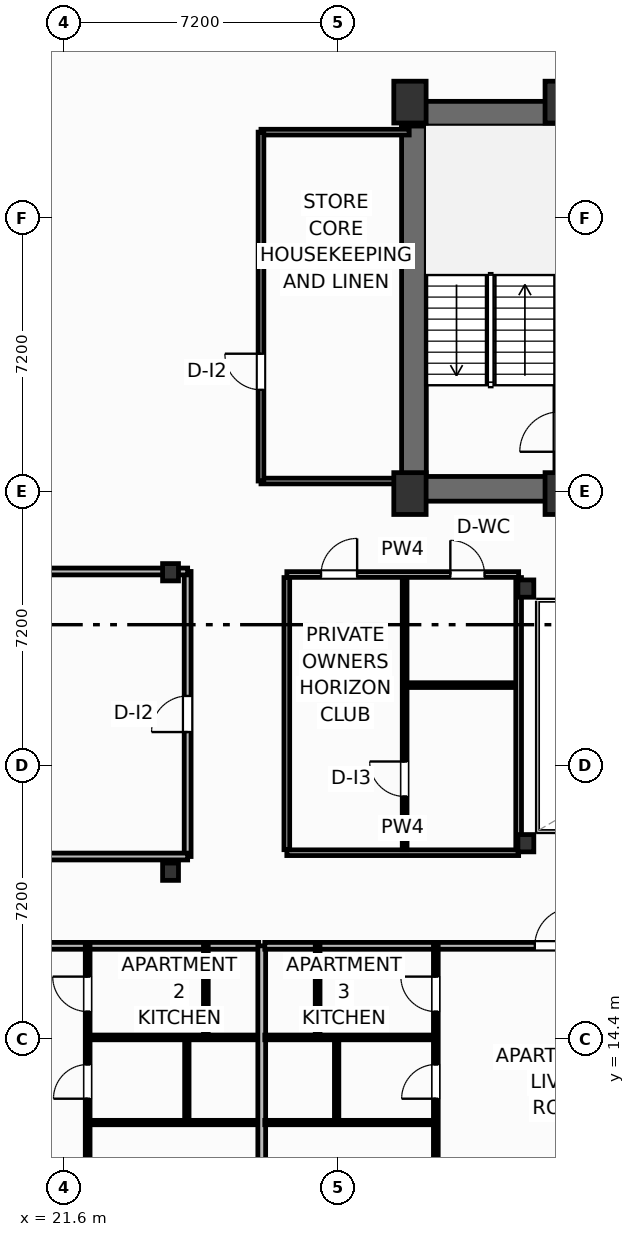
"""IFC4 building model, lengths in metres.
Left out: names, types, materials, properties, quantities, classifications, styles, units other than length and angle.
Written with IfcOpenShell. Run it as: python <this file> out.ifc"""

import sys

from ifc_helpers import new_model, si_unit, direction, frame, frame_2d, origin, origin_2d, place, context, subcontext, project, spatial, rectangle, i_section, extrude, element, fill, save


model = new_model("IFC4")
c1 = context("Model", 3, precision=1e-05, world=origin(), true_north=direction((0.0, 1.0)))
c2 = subcontext(c1, "Body", "Model", "MODEL_VIEW")
j1 = project(units=[si_unit("LENGTHUNIT", "METRE"), si_unit("PLANEANGLEUNIT", "RADIAN")], contexts=[c1])
p1 = place(None, origin())
s1 = spatial("IfcSite", under=j1, at=p1, CompositionType="ELEMENT")
p2 = place(p1, origin())
s2 = spatial("IfcBuilding", under=s1, at=p2, CompositionType="ELEMENT")
p3 = place(p2, frame((0.0, 0.0, 170.9)))
s3 = spatial("IfcBuildingStorey", under=s2, at=p3, CompositionType="ELEMENT", Elevation=170.9)
for number, where, z_axis, x_axis in (
    (1, (30.7, 28.75, 0.0), (0.0, 0.0, 1.0), (1.0, 0.0, 0.0)),
    (2, (34.68, 28.75, 0.0), (0.0, 0.0, 1.0), (1.0, 0.0, 0.0)),
    (3, (30.7, 39.05, 0.0), (0.0, 0.0, 1.0), (1.0, 0.0, 0.0)),
    (4, (34.68, 39.05, 0.0), (0.0, 0.0, 1.0), (1.0, 0.0, 0.0)),
):
    element("IfcColumn", number, at=place(p3, frame(where, z_axis=z_axis, x_axis=x_axis)), inside=s3, PredefinedType="COLUMN", context=c2, shape_type="SweptSolid", body=[
        extrude(rectangle(XDim=0.85, YDim=1.1, at=origin_2d()), origin(), (0.0, 0.0, 1.0), 3.7),
    ])
for number, where, z_axis, x_axis in (
    (5, (33.75, 19.55, 0.0), (0.0, 0.0, 1.0), (1.0, 0.0, 0.0)),
    (6, (33.75, 26.25, 0.0), (0.0, 0.0, 1.0), (1.0, 0.0, 0.0)),
    (7, (24.4, 18.8, 0.0), (0.0, 0.0, 1.0), (1.0, 0.0, 0.0)),
    (8, (24.4, 26.68, 0.0), (0.0, 0.0, 1.0), (1.0, 0.0, 0.0)),
):
    element("IfcColumn", number, at=place(p3, frame(where, z_axis=z_axis, x_axis=x_axis)), inside=s3, PredefinedType="COLUMN", context=c2, shape_type="SweptSolid", body=[
        extrude(i_section(OverallWidth=0.418, OverallDepth=0.455, WebThickness=0.042, FlangeThickness=0.068, FilletRadius=0.025, at=origin_2d()), origin(), (0.0, 0.0, 1.0), 3.7),
    ])
p4 = place(p3, frame((30.48, 38.745, 0.0), z_axis=(0.0, 0.0, 1.0), x_axis=(1.0, 0.0, 0.0)))
e9 = element("IfcWall", 9, at=p4, inside=s3, PredefinedType="SHEAR", context=c2, shape_type="SweptSolid", body=[
    extrude(rectangle(XDim=17.44, YDim=0.65, at=frame_2d((8.72, 0.0))), origin(), (0.0, 0.0, 1.0), 3.45),
])
p5 = place(p3, frame((30.805, 29.2, 0.0), z_axis=(0.0, 0.0, 1.0), x_axis=(0.0, 1.0, 0.0)))
e10 = element("IfcWall", 10, at=p5, inside=s3, PredefinedType="SHEAR", context=c2, shape_type="SweptSolid", body=[
    extrude(rectangle(XDim=9.22, YDim=0.65, at=frame_2d((4.61, 0.0))), origin(), (0.0, 0.0, 1.0), 3.45),
])
p6 = place(p3, frame((30.48, 28.875, 0.0), z_axis=(0.0, 0.0, 1.0), x_axis=(1.0, 0.0, 0.0)))
e11 = element("IfcWall", 11, at=p6, inside=s3, PredefinedType="SHEAR", context=c2, shape_type="SweptSolid", body=[
    extrude(rectangle(XDim=4.32, YDim=0.65, at=frame_2d((2.16, 0.0))), origin(), (0.0, 0.0, 1.0), 3.45),
])
p7 = place(p3, frame((34.64, 29.2, 0.0), z_axis=(0.0, 0.0, 1.0), x_axis=(0.0, 1.0, 0.0)))
e12 = element("IfcWall", 12, at=p7, inside=s3, PredefinedType="SHEAR", context=c2, shape_type="SweptSolid", body=[
    extrude(rectangle(XDim=9.22, YDim=0.25, at=frame_2d((4.61, 0.0))), origin(), (0.0, 0.0, 1.0), 3.45),
])
p8 = place(p7, frame((0.65, 0.0, 0.0)))
e13 = element("IfcOpeningElement", 13, at=p8, cuts=e12, PredefinedType="OPENING", context=c2, shape_type="SweptSolid", body=[
    extrude(rectangle(XDim=1.05, YDim=2.15, at=frame_2d((0.525, 1.075))), frame((0.0, 0.135, 0.0), z_axis=(0.0, -1.0, 0.0), x_axis=(1.0, 0.0, 0.0)), (0.0, 0.0, 1.0), 0.27),
])
p9 = place(p3, frame((16.08, 16.85, 0.0), z_axis=(0.0, 0.0, 1.0), x_axis=(1.0, 0.0, 0.0)))
e14 = element("IfcWall", 14, at=p9, inside=s3, PredefinedType="PARTITIONING", context=c2, shape_type="SweptSolid", body=[
    extrude(rectangle(XDim=10.64, YDim=0.18, at=frame_2d((5.32, 0.0))), origin(), (0.0, 0.0, 1.0), 3.45),
])
p10 = place(p9, frame((2.535, 0.0, 0.0)))
e15 = element("IfcOpeningElement", 15, at=p10, cuts=e14, PredefinedType="OPENING", context=c2, shape_type="SweptSolid", body=[
    extrude(rectangle(XDim=1.0, YDim=2.2, at=frame_2d((0.5, 1.1))), frame((0.0, 0.1, 0.0), z_axis=(0.0, -1.0, 0.0), x_axis=(1.0, 0.0, 0.0)), (0.0, 0.0, 1.0), 0.2),
])
p11 = place(p3, frame((22.219, 1.322, 0.0), z_axis=(0.0, 0.0, 1.0), x_axis=(0.0, 1.0, 0.0)))
e16 = element("IfcWall", 16, at=p11, inside=s3, PredefinedType="PARTITIONING", context=c2, shape_type="SweptSolid", body=[
    extrude(rectangle(XDim=15.528, YDim=0.125, at=frame_2d((7.764, 0.0))), origin(), (0.0, 0.0, 1.0), 3.45),
])
p12 = place(p11, frame((4.919, 0.0, 0.0)))
e17 = element("IfcOpeningElement", 17, at=p12, cuts=e16, PredefinedType="OPENING", context=c2, shape_type="SweptSolid", body=[
    extrude(rectangle(XDim=0.92, YDim=2.05, at=frame_2d((0.46, 1.025))), frame((0.0, 0.073, 0.0), z_axis=(0.0, -1.0, 0.0), x_axis=(1.0, 0.0, 0.0)), (0.0, 0.0, 1.0), 0.145),
])
p13 = place(p11, frame((11.505, 0.0, 0.0)))
e18 = element("IfcOpeningElement", 18, at=p13, cuts=e16, PredefinedType="OPENING", context=c2, shape_type="SweptSolid", body=[
    extrude(rectangle(XDim=0.9, YDim=2.05, at=frame_2d((0.45, 1.025))), frame((0.0, 0.073, 0.0), z_axis=(0.0, -1.0, 0.0), x_axis=(1.0, 0.0, 0.0)), (0.0, 0.0, 1.0), 0.145),
])
p14 = place(p11, frame((13.798, 0.0, 0.0)))
e19 = element("IfcOpeningElement", 19, at=p14, cuts=e16, PredefinedType="OPENING", context=c2, shape_type="SweptSolid", body=[
    extrude(rectangle(XDim=0.92, YDim=2.05, at=frame_2d((0.46, 1.025))), frame((0.0, 0.073, 0.0), z_axis=(0.0, -1.0, 0.0), x_axis=(1.0, 0.0, 0.0)), (0.0, 0.0, 1.0), 0.145),
])
p15 = place(p3, frame((22.289, 14.44, 0.0), z_axis=(0.0, 0.0, 1.0), x_axis=(1.0, 0.0, 0.0)))
e20 = element("IfcWall", 20, at=p15, inside=s3, PredefinedType="PARTITIONING", context=c2, shape_type="SweptSolid", body=[
    extrude(rectangle(XDim=4.431, YDim=0.125, at=frame_2d((2.215, 0.0))), origin(), (0.0, 0.0, 1.0), 3.45),
])
p16 = place(p3, frame((22.289, 12.2, 0.0), z_axis=(0.0, 0.0, 1.0), x_axis=(1.0, 0.0, 0.0)))
e21 = element("IfcWall", 21, at=p16, inside=s3, PredefinedType="PARTITIONING", context=c2, shape_type="SweptSolid", body=[
    extrude(rectangle(XDim=4.431, YDim=0.115, at=frame_2d((2.215, 0.0))), origin(), (0.0, 0.0, 1.0), 3.45),
])
p17 = place(p3, frame((25.329, 14.44, 0.0), z_axis=(0.0, 0.0, 1.0), x_axis=(0.0, 1.0, 0.0)))
e22 = element("IfcWall", 22, at=p17, inside=s3, PredefinedType="PARTITIONING", context=c2, shape_type="SweptSolid", body=[
    extrude(rectangle(XDim=2.41, YDim=0.125, at=frame_2d((1.205, 0.0))), origin(), (0.0, 0.0, 1.0), 3.45),
])
p18 = place(p3, frame((24.829, 12.2, 0.0), z_axis=(0.0, 0.0, 1.0), x_axis=(0.0, 1.0, 0.0)))
e23 = element("IfcWall", 23, at=p18, inside=s3, PredefinedType="PARTITIONING", context=c2, shape_type="SweptSolid", body=[
    extrude(rectangle(XDim=2.24, YDim=0.115, at=frame_2d((1.12, 0.0))), origin(), (0.0, 0.0, 1.0), 3.45),
])
p19 = place(p3, frame((26.8, 3.993, 0.0), z_axis=(0.0, 0.0, 1.0), x_axis=(0.0, 1.0, 0.0)))
e24 = element("IfcWall", 24, at=p19, inside=s3, PredefinedType="PARTITIONING", context=c2, shape_type="SweptSolid", body=[
    extrude(rectangle(XDim=12.857, YDim=0.205, at=frame_2d((6.429, 0.0))), origin(), (0.0, 0.0, 1.0), 3.45),
])
p20 = place(p3, frame((26.88, 16.85, 0.0), z_axis=(0.0, 0.0, 1.0), x_axis=(1.0, 0.0, 0.0)))
e25 = element("IfcWall", 25, at=p20, inside=s3, PredefinedType="PARTITIONING", context=c2, shape_type="SweptSolid", body=[
    extrude(rectangle(XDim=10.64, YDim=0.18, at=frame_2d((5.32, 0.0))), origin(), (0.0, 0.0, 1.0), 3.45),
])
p21 = place(p20, frame((7.105, 0.0, 0.0)))
e26 = element("IfcOpeningElement", 26, at=p21, cuts=e25, PredefinedType="OPENING", context=c2, shape_type="SweptSolid", body=[
    extrude(rectangle(XDim=1.0, YDim=2.2, at=frame_2d((0.5, 1.1))), frame((0.0, 0.1, 0.0), z_axis=(0.0, -1.0, 0.0), x_axis=(1.0, 0.0, 0.0)), (0.0, 0.0, 1.0), 0.2),
])
p22 = place(p3, frame((31.381, 2.433, 0.0), z_axis=(0.0, 0.0, 1.0), x_axis=(0.0, 1.0, 0.0)))
e27 = element("IfcWall", 27, at=p22, inside=s3, PredefinedType="PARTITIONING", context=c2, shape_type="SweptSolid", body=[
    extrude(rectangle(XDim=14.417, YDim=0.125, at=frame_2d((7.208, 0.0))), origin(), (0.0, 0.0, 1.0), 3.45),
])
p23 = place(p22, frame((4.364, 0.0, 0.0)))
e28 = element("IfcOpeningElement", 28, at=p23, cuts=e27, PredefinedType="OPENING", context=c2, shape_type="SweptSolid", body=[
    extrude(rectangle(XDim=0.92, YDim=2.05, at=frame_2d((0.46, 1.025))), frame((0.0, 0.073, 0.0), z_axis=(0.0, -1.0, 0.0), x_axis=(1.0, 0.0, 0.0)), (0.0, 0.0, 1.0), 0.145),
])
p24 = place(p22, frame((10.395, 0.0, 0.0)))
e29 = element("IfcOpeningElement", 29, at=p24, cuts=e27, PredefinedType="OPENING", context=c2, shape_type="SweptSolid", body=[
    extrude(rectangle(XDim=0.9, YDim=2.05, at=frame_2d((0.45, 1.025))), frame((0.0, 0.073, 0.0), z_axis=(0.0, -1.0, 0.0), x_axis=(1.0, 0.0, 0.0)), (0.0, 0.0, 1.0), 0.145),
])
p25 = place(p22, frame((12.687, 0.0, 0.0)))
e30 = element("IfcOpeningElement", 30, at=p25, cuts=e27, PredefinedType="OPENING", context=c2, shape_type="SweptSolid", body=[
    extrude(rectangle(XDim=0.92, YDim=2.05, at=frame_2d((0.46, 1.025))), frame((0.0, 0.073, 0.0), z_axis=(0.0, -1.0, 0.0), x_axis=(1.0, 0.0, 0.0)), (0.0, 0.0, 1.0), 0.145),
])
p26 = place(p3, frame((26.88, 14.44, 0.0), z_axis=(0.0, 0.0, 1.0), x_axis=(1.0, 0.0, 0.0)))
e31 = element("IfcWall", 31, at=p26, inside=s3, PredefinedType="PARTITIONING", context=c2, shape_type="SweptSolid", body=[
    extrude(rectangle(XDim=4.431, YDim=0.125, at=frame_2d((2.215, 0.0))), origin(), (0.0, 0.0, 1.0), 3.45),
])
p27 = place(p3, frame((26.88, 12.2, 0.0), z_axis=(0.0, 0.0, 1.0), x_axis=(1.0, 0.0, 0.0)))
e32 = element("IfcWall", 32, at=p27, inside=s3, PredefinedType="PARTITIONING", context=c2, shape_type="SweptSolid", body=[
    extrude(rectangle(XDim=4.431, YDim=0.115, at=frame_2d((2.215, 0.0))), origin(), (0.0, 0.0, 1.0), 3.45),
])
p28 = place(p3, frame((28.271, 14.44, 0.0), z_axis=(0.0, 0.0, 1.0), x_axis=(0.0, 1.0, 0.0)))
e33 = element("IfcWall", 33, at=p28, inside=s3, PredefinedType="PARTITIONING", context=c2, shape_type="SweptSolid", body=[
    extrude(rectangle(XDim=2.41, YDim=0.125, at=frame_2d((1.205, 0.0))), origin(), (0.0, 0.0, 1.0), 3.45),
])
p29 = place(p3, frame((28.771, 12.2, 0.0), z_axis=(0.0, 0.0, 1.0), x_axis=(0.0, 1.0, 0.0)))
e34 = element("IfcWall", 34, at=p29, inside=s3, PredefinedType="PARTITIONING", context=c2, shape_type="SweptSolid", body=[
    extrude(rectangle(XDim=2.24, YDim=0.115, at=frame_2d((1.12, 0.0))), origin(), (0.0, 0.0, 1.0), 3.45),
])
p30 = place(p3, frame((24.85, 19.2, 0.0), z_axis=(0.0, 0.0, 1.0), x_axis=(0.0, 1.0, 0.0)))
e35 = element("IfcWall", 35, at=p30, inside=s3, PredefinedType="PARTITIONING", context=c2, shape_type="SweptSolid", body=[
    extrude(rectangle(XDim=7.5, YDim=0.18, at=frame_2d((3.75, 0.0))), origin(), (0.0, 0.0, 1.0), 3.45),
])
p31 = place(p30, frame((3.275, 0.0, 0.0)))
e36 = element("IfcOpeningElement", 36, at=p31, cuts=e35, PredefinedType="OPENING", context=c2, shape_type="SweptSolid", body=[
    extrude(rectangle(XDim=0.95, YDim=2.05, at=frame_2d((0.475, 1.025))), frame((0.0, 0.1, 0.0), z_axis=(0.0, -1.0, 0.0), x_axis=(1.0, 0.0, 0.0)), (0.0, 0.0, 1.0), 0.2),
])
p32 = place(p3, frame((4.562, 19.2, 0.0), z_axis=(0.0, 0.0, 1.0), x_axis=(1.0, 0.0, 0.0)))
e37 = element("IfcWall", 37, at=p32, inside=s3, PredefinedType="PARTITIONING", context=c2, shape_type="SweptSolid", body=[
    extrude(rectangle(XDim=20.288, YDim=0.18, at=frame_2d((10.144, 0.0))), origin(), (0.0, 0.0, 1.0), 3.45),
])
p33 = place(p3, frame((3.653, 26.7, 0.0), z_axis=(0.0, 0.0, 1.0), x_axis=(1.0, 0.0, 0.0)))
e38 = element("IfcWall", 38, at=p33, inside=s3, PredefinedType="PARTITIONING", context=c2, shape_type="SweptSolid", body=[
    extrude(rectangle(XDim=21.197, YDim=0.18, at=frame_2d((10.599, 0.0))), origin(), (0.0, 0.0, 1.0), 2.662),
])
p34 = place(p3, frame((27.46, 26.62, 0.0), z_axis=(0.0, 0.0, 1.0), x_axis=(1.0, 0.0, 0.0)))
e39 = element("IfcWall", 39, at=p34, inside=s3, PredefinedType="PARTITIONING", context=c2, shape_type="SweptSolid", body=[
    extrude(rectangle(XDim=6.1, YDim=0.15, at=frame_2d((3.05, 0.0))), origin(), (0.0, 0.0, 1.0), 2.662),
])
p35 = place(p34, frame((0.9, 0.0, 0.0)))
e40 = element("IfcOpeningElement", 40, at=p35, cuts=e39, PredefinedType="OPENING", context=c2, shape_type="SweptSolid", body=[
    extrude(rectangle(XDim=0.95, YDim=2.05, at=frame_2d((0.475, 1.025))), frame((0.0, 0.085, 0.0), z_axis=(0.0, -1.0, 0.0), x_axis=(1.0, 0.0, 0.0)), (0.0, 0.0, 1.0), 0.17),
])
p36 = place(p34, frame((4.303, 0.0, 0.0)))
e41 = element("IfcOpeningElement", 41, at=p36, cuts=e39, PredefinedType="OPENING", context=c2, shape_type="SweptSolid", body=[
    extrude(rectangle(XDim=0.9, YDim=2.05, at=frame_2d((0.45, 1.025))), frame((0.0, 0.085, 0.0), z_axis=(0.0, -1.0, 0.0), x_axis=(1.0, 0.0, 0.0)), (0.0, 0.0, 1.0), 0.17),
])
p37 = place(p3, frame((27.46, 19.3, 0.0), z_axis=(0.0, 0.0, 1.0), x_axis=(1.0, 0.0, 0.0)))
e42 = element("IfcWall", 42, at=p37, inside=s3, PredefinedType="PARTITIONING", context=c2, shape_type="SweptSolid", body=[
    extrude(rectangle(XDim=6.1, YDim=0.15, at=frame_2d((3.05, 0.0))), origin(), (0.0, 0.0, 1.0), 2.662),
])
p38 = place(p3, frame((30.56, 19.38, 0.0), z_axis=(0.0, 0.0, 1.0), x_axis=(0.0, 1.0, 0.0)))
e43 = element("IfcWall", 43, at=p38, inside=s3, PredefinedType="PARTITIONING", context=c2, shape_type="SweptSolid", body=[
    extrude(rectangle(XDim=7.16, YDim=0.125, at=frame_2d((3.58, 0.0))), origin(), (0.0, 0.0, 1.0), 3.45),
])
p39 = place(p38, frame((1.4, 0.0, 0.0)))
e44 = element("IfcOpeningElement", 44, at=p39, cuts=e43, PredefinedType="OPENING", context=c2, shape_type="SweptSolid", body=[
    extrude(rectangle(XDim=0.92, YDim=2.05, at=frame_2d((0.46, 1.025))), frame((0.0, 0.073, 0.0), z_axis=(0.0, -1.0, 0.0), x_axis=(1.0, 0.0, 0.0)), (0.0, 0.0, 1.0), 0.145),
])
p40 = place(p3, frame((30.64, 23.71, 0.0), z_axis=(0.0, 0.0, 1.0), x_axis=(1.0, 0.0, 0.0)))
e45 = element("IfcWall", 45, at=p40, inside=s3, PredefinedType="PARTITIONING", context=c2, shape_type="SweptSolid", body=[
    extrude(rectangle(XDim=2.88, YDim=0.125, at=frame_2d((1.44, 0.0))), origin(), (0.0, 0.0, 1.0), 3.45),
])
p41 = place(p3, frame((27.46, 19.38, 0.0), z_axis=(0.0, 0.0, 1.0), x_axis=(0.0, 1.0, 0.0)))
e46 = element("IfcWall", 46, at=p41, inside=s3, PredefinedType="PARTITIONING", context=c2, shape_type="SweptSolid", body=[
    extrude(rectangle(XDim=7.16, YDim=0.15, at=frame_2d((3.58, 0.0))), origin(), (0.0, 0.0, 1.0), 3.45),
])
p42 = place(p3, frame((33.56, 19.38, 0.0), z_axis=(0.0, 0.0, 1.0), x_axis=(0.0, 1.0, 0.0)))
e47 = element("IfcWall", 47, at=p42, inside=s3, PredefinedType="PARTITIONING", context=c2, shape_type="SweptSolid", body=[
    extrude(rectangle(XDim=7.16, YDim=0.15, at=frame_2d((3.58, 0.0))), origin(), (0.0, 0.0, 1.0), 2.824),
])
p43 = place(p3, frame((26.78, 29.08, 0.0), z_axis=(0.0, 0.0, 1.0), x_axis=(1.0, 0.0, 0.0)))
e48 = element("IfcWall", 48, at=p43, inside=s3, PredefinedType="PARTITIONING", context=c2, shape_type="SweptSolid", body=[
    extrude(rectangle(XDim=3.7, YDim=0.15, at=frame_2d((1.85, 0.0))), origin(), (0.0, 0.0, 1.0), 3.45),
])
p44 = place(p3, frame((26.78, 38.26, 0.0), z_axis=(0.0, 0.0, 1.0), x_axis=(1.0, 0.0, 0.0)))
e49 = element("IfcWall", 49, at=p44, inside=s3, PredefinedType="PARTITIONING", context=c2, shape_type="SweptSolid", body=[
    extrude(rectangle(XDim=3.9, YDim=0.15, at=frame_2d((1.95, 0.0))), origin(), (0.0, 0.0, 1.0), 3.45),
])
p45 = place(p3, frame((26.78, 29.08, 0.0), z_axis=(0.0, 0.0, 1.0), x_axis=(0.0, 1.0, 0.0)))
e50 = element("IfcWall", 50, at=p45, inside=s3, PredefinedType="PARTITIONING", context=c2, shape_type="SweptSolid", body=[
    extrude(rectangle(XDim=9.18, YDim=0.15, at=frame_2d((4.59, 0.0))), origin(), (0.0, 0.0, 1.0), 3.45),
])
p46 = place(p45, frame((2.4, 0.0, 0.0)))
e51 = element("IfcOpeningElement", 51, at=p46, cuts=e50, PredefinedType="OPENING", context=c2, shape_type="SweptSolid", body=[
    extrude(rectangle(XDim=0.95, YDim=2.05, at=frame_2d((0.475, 1.025))), frame((0.0, 0.085, 0.0), z_axis=(0.0, -1.0, 0.0), x_axis=(1.0, 0.0, 0.0)), (0.0, 0.0, 1.0), 0.17),
])
p47 = place(p13, origin())
e52 = element("IfcDoor", 52, at=p47, inside=s3, OperationType="SINGLE_SWING_LEFT", PredefinedType="DOOR", context=c2, shape_type="SweptSolid", body=[
    extrude(rectangle(XDim=0.9, YDim=2.05, at=frame_2d((0.45, 1.025))), frame((0.0, 0.025, 0.0), z_axis=(0.0, -1.0, 0.0), x_axis=(1.0, 0.0, 0.0)), (0.0, 0.0, 1.0), 0.05),
])
fill(e18, e52)
p48 = place(p14, origin())
e53 = element("IfcDoor", 53, at=p48, inside=s3, OperationType="SINGLE_SWING_RIGHT", PredefinedType="DOOR", context=c2, shape_type="SweptSolid", body=[
    extrude(rectangle(XDim=0.92, YDim=2.05, at=frame_2d((0.46, 1.025))), frame((0.0, 0.025, 0.0), z_axis=(0.0, -1.0, 0.0), x_axis=(1.0, 0.0, 0.0)), (0.0, 0.0, 1.0), 0.05),
])
fill(e19, e53)
p49 = place(p21, origin())
e54 = element("IfcDoor", 54, at=p49, inside=s3, OperationType="SINGLE_SWING_RIGHT", PredefinedType="DOOR", context=c2, shape_type="SweptSolid", body=[
    extrude(rectangle(XDim=1.0, YDim=2.2, at=frame_2d((0.5, 1.1))), frame((0.0, 0.025, 0.0), z_axis=(0.0, -1.0, 0.0), x_axis=(1.0, 0.0, 0.0)), (0.0, 0.0, 1.0), 0.05),
])
fill(e26, e54)
p50 = place(p24, origin())
e55 = element("IfcDoor", 55, at=p50, inside=s3, OperationType="SINGLE_SWING_LEFT", PredefinedType="DOOR", context=c2, shape_type="SweptSolid", body=[
    extrude(rectangle(XDim=0.9, YDim=2.05, at=frame_2d((0.45, 1.025))), frame((0.0, 0.025, 0.0), z_axis=(0.0, -1.0, 0.0), x_axis=(1.0, 0.0, 0.0)), (0.0, 0.0, 1.0), 0.05),
])
fill(e29, e55)
p51 = place(p25, origin())
e56 = element("IfcDoor", 56, at=p51, inside=s3, OperationType="SINGLE_SWING_RIGHT", PredefinedType="DOOR", context=c2, shape_type="SweptSolid", body=[
    extrude(rectangle(XDim=0.92, YDim=2.05, at=frame_2d((0.46, 1.025))), frame((0.0, 0.025, 0.0), z_axis=(0.0, -1.0, 0.0), x_axis=(1.0, 0.0, 0.0)), (0.0, 0.0, 1.0), 0.05),
])
fill(e30, e56)
p52 = place(p31, origin())
e57 = element("IfcDoor", 57, at=p52, inside=s3, OperationType="SINGLE_SWING_LEFT", PredefinedType="DOOR", context=c2, shape_type="SweptSolid", body=[
    extrude(rectangle(XDim=0.95, YDim=2.05, at=frame_2d((0.475, 1.025))), frame((0.0, 0.025, 0.0), z_axis=(0.0, -1.0, 0.0), x_axis=(1.0, 0.0, 0.0)), (0.0, 0.0, 1.0), 0.05),
])
fill(e36, e57)
p53 = place(p35, origin())
e58 = element("IfcDoor", 58, at=p53, inside=s3, OperationType="SINGLE_SWING_RIGHT", PredefinedType="DOOR", context=c2, shape_type="SweptSolid", body=[
    extrude(rectangle(XDim=0.95, YDim=2.05, at=frame_2d((0.475, 1.025))), frame((0.0, 0.025, 0.0), z_axis=(0.0, -1.0, 0.0), x_axis=(1.0, 0.0, 0.0)), (0.0, 0.0, 1.0), 0.05),
])
fill(e40, e58)
p54 = place(p36, origin())
e59 = element("IfcDoor", 59, at=p54, inside=s3, OperationType="SINGLE_SWING_LEFT", PredefinedType="DOOR", context=c2, shape_type="SweptSolid", body=[
    extrude(rectangle(XDim=0.9, YDim=2.05, at=frame_2d((0.45, 1.025))), frame((0.0, 0.025, 0.0), z_axis=(0.0, -1.0, 0.0), x_axis=(1.0, 0.0, 0.0)), (0.0, 0.0, 1.0), 0.05),
])
fill(e41, e59)
p55 = place(p39, origin())
e60 = element("IfcDoor", 60, at=p55, inside=s3, OperationType="SINGLE_SWING_RIGHT", PredefinedType="DOOR", context=c2, shape_type="SweptSolid", body=[
    extrude(rectangle(XDim=0.92, YDim=2.05, at=frame_2d((0.46, 1.025))), frame((0.0, 0.025, 0.0), z_axis=(0.0, -1.0, 0.0), x_axis=(1.0, 0.0, 0.0)), (0.0, 0.0, 1.0), 0.05),
])
fill(e44, e60)
p56 = place(p46, origin())
e61 = element("IfcDoor", 61, at=p56, inside=s3, OperationType="SINGLE_SWING_RIGHT", PredefinedType="DOOR", context=c2, shape_type="SweptSolid", body=[
    extrude(rectangle(XDim=0.95, YDim=2.05, at=frame_2d((0.475, 1.025))), frame((0.0, 0.025, 0.0), z_axis=(0.0, -1.0, 0.0), x_axis=(1.0, 0.0, 0.0)), (0.0, 0.0, 1.0), 0.05),
])
fill(e51, e61)
save(model, sys.argv[1])
